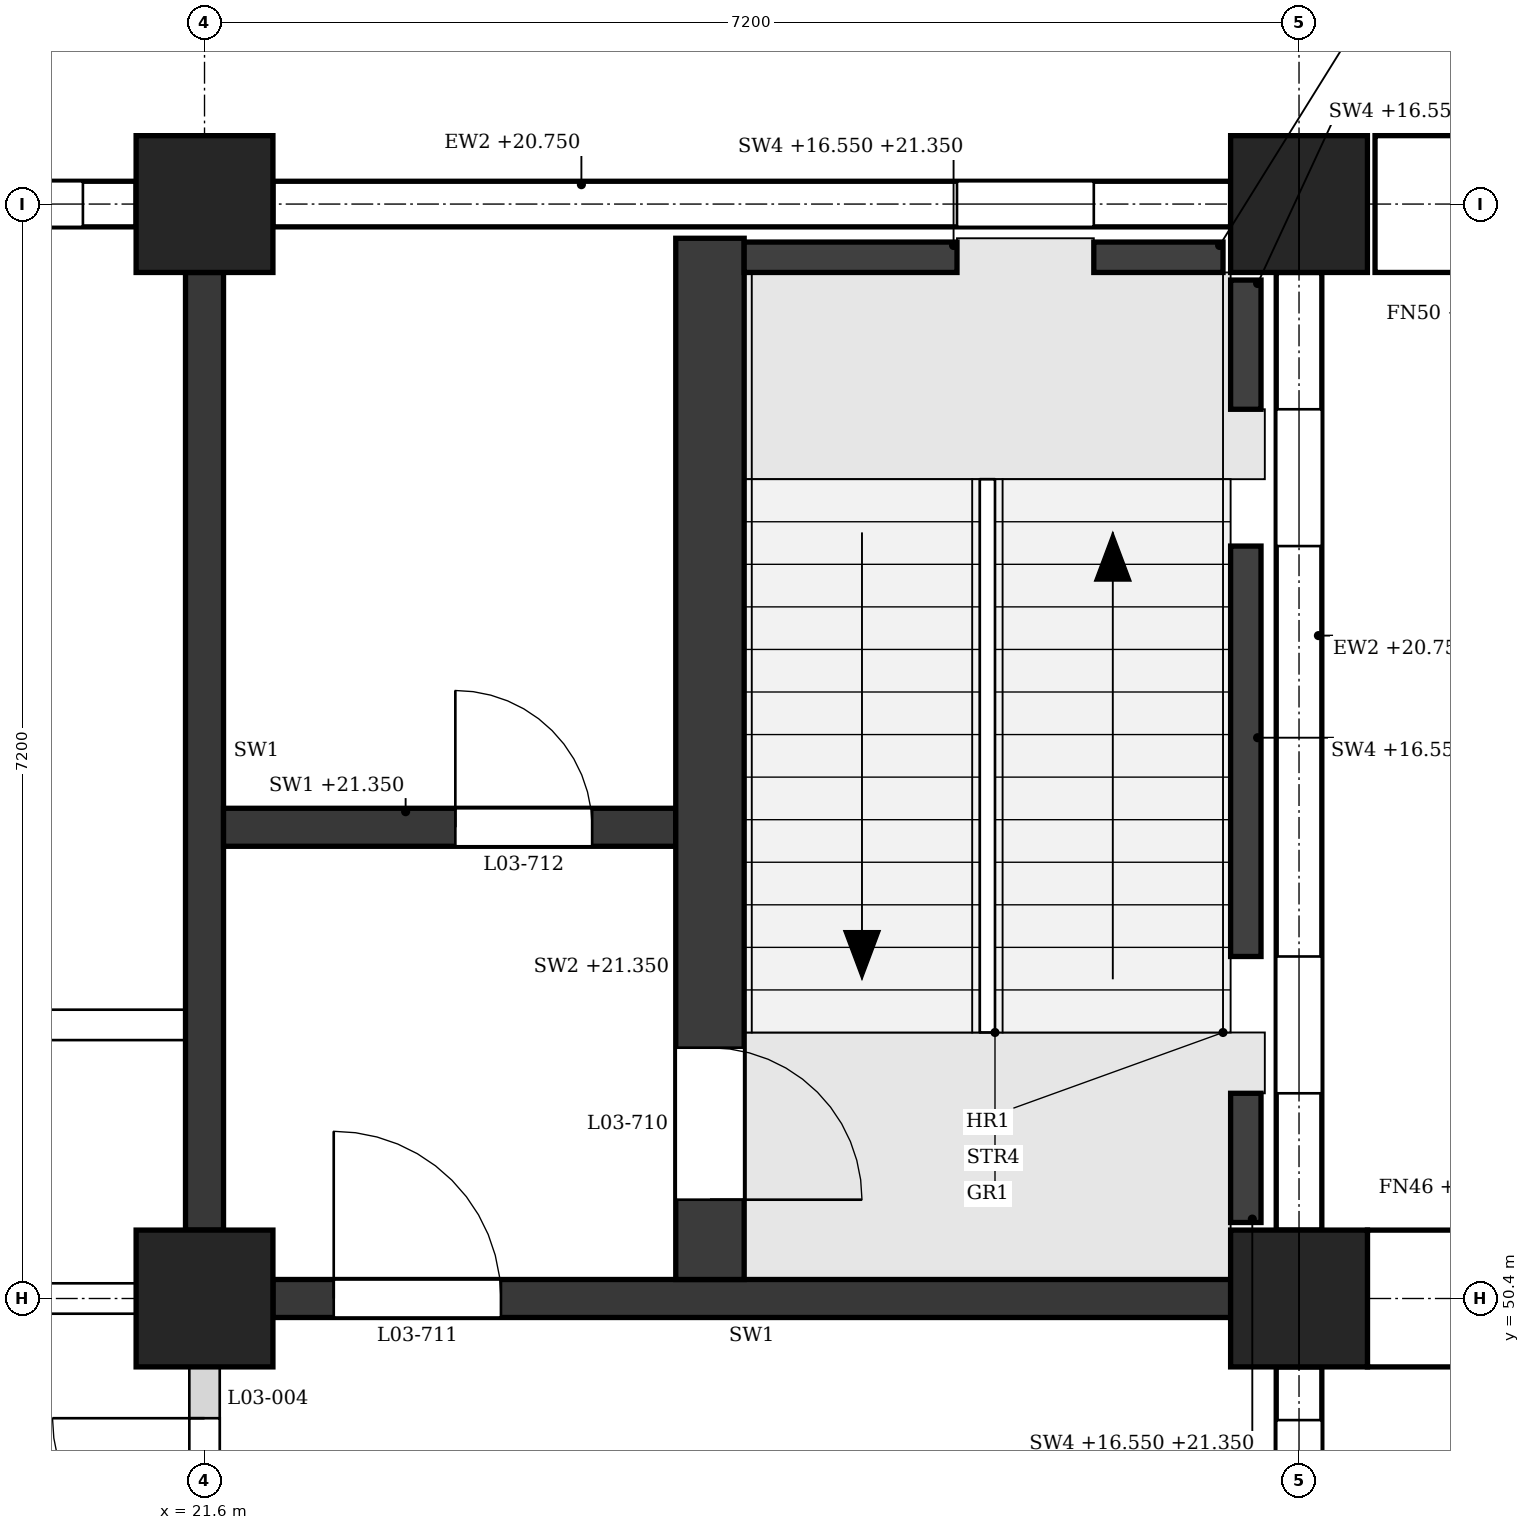
"""IFC4 building model, lengths in metres.
Left out: names, types, materials, properties, quantities, classifications, styles, units other than length and angle.
Written with IfcOpenShell. Run it as: python <this file> out.ifc"""

import sys

from ifc_helpers import new_model, si_unit, direction, frame, frame_2d, origin, origin_2d, place, context, subcontext, project, spatial, polyline, rectangle, outline, extrude, element, fill, save


model = new_model("IFC4")
c1 = context("Model", 3, precision=1e-05, world=origin(), true_north=direction((0.0, 1.0)))
c2 = subcontext(c1, "Body", "Model", "MODEL_VIEW")
j1 = project(units=[si_unit("LENGTHUNIT", "METRE"), si_unit("PLANEANGLEUNIT", "RADIAN")], contexts=[c1])
p1 = place(None, origin())
s1 = spatial("IfcSite", under=j1, at=p1, CompositionType="ELEMENT")
p2 = place(p1, origin())
s2 = spatial("IfcBuilding", under=s1, at=p2, CompositionType="ELEMENT")
p3 = place(p2, frame((0.0, 0.0, 16.8)))
s3 = spatial("IfcBuildingStorey", under=s2, at=p3, CompositionType="ELEMENT", Elevation=16.8)
for number, where, z_axis, x_axis in (
    (1, (21.6, 50.4, 0.0), (0.0, 0.0, 1.0), (1.0, 0.0, 0.0)),
    (2, (21.6, 57.6, 0.0), (0.0, 0.0, 1.0), (1.0, 0.0, 0.0)),
    (3, (28.8, 50.4, 0.0), (0.0, 0.0, 1.0), (1.0, 0.0, 0.0)),
    (4, (28.8, 57.6, 0.0), (0.0, 0.0, 1.0), (1.0, 0.0, 0.0)),
):
    element("IfcColumn", number, at=place(p3, frame(where, z_axis=z_axis, x_axis=x_axis)), inside=s3, PredefinedType="COLUMN", context=c2, shape_type="SweptSolid", body=[
        extrude(rectangle(XDim=0.9, YDim=0.9, at=origin_2d()), origin(), (0.0, 0.0, 1.0), 4.8),
    ])
p4 = place(p3, frame((28.35, 57.6, 0.0), z_axis=(0.0, 0.0, 1.0), x_axis=(-1.0, 0.0, 0.0)))
e5 = element("IfcWall", 5, at=p4, inside=s3, PredefinedType="STANDARD", context=c2, shape_type="SweptSolid", body=[
    extrude(rectangle(XDim=6.3, YDim=0.3, at=frame_2d((3.15, 0.0))), origin(), (0.0, 0.0, 1.0), 3.95),
])
p5 = place(p4, frame((0.9, 0.0, 0.9)))
e6 = element("IfcOpeningElement", 6, at=p5, cuts=e5, PredefinedType="OPENING", context=c2, shape_type="SweptSolid", body=[
    extrude(outline(polyline([(0.0, 0.0), (0.9, 0.0), (0.9, 2.05), (0.45, 2.5), (0.0, 2.05), (0.0, 0.0)])), frame((0.0, 0.16, 0.0), z_axis=(0.0, -1.0, 0.0), x_axis=(1.0, 0.0, 0.0)), (0.0, 0.0, 1.0), 0.32),
])
p6 = place(p3, frame((21.15, 57.6, 0.0), z_axis=(0.0, 0.0, 1.0), x_axis=(-1.0, 0.0, 0.0)))
e7 = element("IfcWall", 7, at=p6, inside=s3, PredefinedType="STANDARD", context=c2, shape_type="SweptSolid", body=[
    extrude(rectangle(XDim=6.3, YDim=0.3, at=frame_2d((3.15, 0.0))), origin(), (0.0, 0.0, 1.0), 3.95),
])
p7 = place(p6, frame((0.35, 0.0, 0.9)))
e8 = element("IfcOpeningElement", 8, at=p7, cuts=e7, PredefinedType="OPENING", context=c2, shape_type="SweptSolid", body=[
    extrude(outline(polyline([(0.0, 0.0), (0.85, 0.0), (0.85, 2.05), (0.425, 2.5), (0.0, 2.05), (0.0, 0.0)])), frame((0.0, 0.16, 0.0), z_axis=(0.0, -1.0, 0.0), x_axis=(1.0, 0.0, 0.0)), (0.0, 0.0, 1.0), 0.32),
])
p8 = place(p6, frame((1.5, 0.0, 0.9)))
e9 = element("IfcOpeningElement", 9, at=p8, cuts=e7, PredefinedType="OPENING", context=c2, shape_type="SweptSolid", body=[
    extrude(outline(polyline([(0.0, 0.0), (0.85, 0.0), (0.85, 2.05), (0.425, 2.5), (0.0, 2.05), (0.0, 0.0)])), frame((0.0, 0.16, 0.0), z_axis=(0.0, -1.0, 0.0), x_axis=(1.0, 0.0, 0.0)), (0.0, 0.0, 1.0), 0.32),
])
p9 = place(p6, frame((3.95, 0.0, 0.9)))
e10 = element("IfcOpeningElement", 10, at=p9, cuts=e7, PredefinedType="OPENING", context=c2, shape_type="SweptSolid", body=[
    extrude(outline(polyline([(0.0, 0.0), (0.85, 0.0), (0.85, 2.05), (0.425, 2.5), (0.0, 2.05), (0.0, 0.0)])), frame((0.0, 0.16, 0.0), z_axis=(0.0, -1.0, 0.0), x_axis=(1.0, 0.0, 0.0)), (0.0, 0.0, 1.0), 0.32),
])
p10 = place(p6, frame((5.1, 0.0, 0.9)))
e11 = element("IfcOpeningElement", 11, at=p10, cuts=e7, PredefinedType="OPENING", context=c2, shape_type="SweptSolid", body=[
    extrude(outline(polyline([(0.0, 0.0), (0.85, 0.0), (0.85, 2.05), (0.425, 2.5), (0.0, 2.05), (0.0, 0.0)])), frame((0.0, 0.16, 0.0), z_axis=(0.0, -1.0, 0.0), x_axis=(1.0, 0.0, 0.0)), (0.0, 0.0, 1.0), 0.32),
])
p11 = place(p3, frame((28.8, 43.65, 0.0), z_axis=(0.0, 0.0, 1.0), x_axis=(0.0, 1.0, 0.0)))
e12 = element("IfcWall", 12, at=p11, inside=s3, PredefinedType="STANDARD", context=c2, shape_type="SweptSolid", body=[
    extrude(rectangle(XDim=6.3, YDim=0.3, at=frame_2d((3.15, 0.0))), origin(), (0.0, 0.0, 1.0), 3.95),
])
p12 = place(p11, frame((3.95, 0.0, 0.9)))
e13 = element("IfcOpeningElement", 13, at=p12, cuts=e12, PredefinedType="OPENING", context=c2, shape_type="SweptSolid", body=[
    extrude(outline(polyline([(0.0, 0.0), (0.85, 0.0), (0.85, 2.05), (0.425, 2.5), (0.0, 2.05), (0.0, 0.0)])), frame((0.0, 0.16, 0.0), z_axis=(0.0, -1.0, 0.0), x_axis=(1.0, 0.0, 0.0)), (0.0, 0.0, 1.0), 0.32),
])
p13 = place(p11, frame((5.1, 0.0, 0.9)))
e14 = element("IfcOpeningElement", 14, at=p13, cuts=e12, PredefinedType="OPENING", context=c2, shape_type="SweptSolid", body=[
    extrude(outline(polyline([(0.0, 0.0), (0.85, 0.0), (0.85, 2.05), (0.425, 2.5), (0.0, 2.05), (0.0, 0.0)])), frame((0.0, 0.16, 0.0), z_axis=(0.0, -1.0, 0.0), x_axis=(1.0, 0.0, 0.0)), (0.0, 0.0, 1.0), 0.32),
])
p14 = place(p3, frame((28.8, 50.85, 0.0), z_axis=(0.0, 0.0, 1.0), x_axis=(0.0, 1.0, 0.0)))
e15 = element("IfcWall", 15, at=p14, inside=s3, PredefinedType="STANDARD", context=c2, shape_type="SweptSolid", body=[
    extrude(rectangle(XDim=6.3, YDim=0.3, at=frame_2d((3.15, 0.0))), origin(), (0.0, 0.0, 1.0), 3.95),
])
p15 = place(p14, frame((0.9, 0.0, 0.9)))
e16 = element("IfcOpeningElement", 16, at=p15, cuts=e15, PredefinedType="OPENING", context=c2, shape_type="SweptSolid", body=[
    extrude(outline(polyline([(0.0, 0.0), (0.9, 0.0), (0.9, 2.05), (0.45, 2.5), (0.0, 2.05), (0.0, 0.0)])), frame((0.0, 0.16, 0.0), z_axis=(0.0, -1.0, 0.0), x_axis=(1.0, 0.0, 0.0)), (0.0, 0.0, 1.0), 0.32),
])
p16 = place(p14, frame((4.5, 0.0, 0.9)))
e17 = element("IfcOpeningElement", 17, at=p16, cuts=e15, PredefinedType="OPENING", context=c2, shape_type="SweptSolid", body=[
    extrude(outline(polyline([(0.0, 0.0), (0.9, 0.0), (0.9, 2.05), (0.45, 2.5), (0.0, 2.05), (0.0, 0.0)])), frame((0.0, 0.16, 0.0), z_axis=(0.0, -1.0, 0.0), x_axis=(1.0, 0.0, 0.0)), (0.0, 0.0, 1.0), 0.32),
])
for number, where, z_axis, x_axis in (
    (18, (29.25, 50.4, 0.0), (0.0, 0.0, 1.0), (1.0, 0.0, 0.0)),
    (19, (29.3, 57.6, 0.0), (0.0, 0.0, 1.0), (1.0, 0.0, 0.0)),
):
    element("IfcWall", number, at=place(p3, frame(where, z_axis=z_axis, x_axis=x_axis)), inside=s3, PredefinedType="POLYGONAL", context=c2, shape_type="SweptSolid", body=[
        extrude(outline(polyline([(1.1, 0.0), (1.1, 4.55), (0.0, 4.55), (0.0, 0.0), (1.1, 0.0)])), frame((0.0, 0.45, 0.0), z_axis=(0.0, -1.0, 0.0), x_axis=(1.0, 0.0, 0.0)), (0.0, 0.0, 1.0), 0.9),
    ])
p17 = place(p3, frame((22.05, 50.4, 0.0), z_axis=(0.0, 0.0, 1.0), x_axis=(1.0, 0.0, 0.0)))
e20 = element("IfcWall", 20, at=p17, inside=s3, PredefinedType="SHEAR", context=c2, shape_type="SweptSolid", body=[
    extrude(rectangle(XDim=6.3, YDim=0.25, at=frame_2d((3.15, 0.0))), origin(), (0.0, 0.0, 1.0), 3.8),
])
p18 = place(p17, frame((0.4, 0.0, 0.0)))
e21 = element("IfcOpeningElement", 21, at=p18, cuts=e20, PredefinedType="OPENING", context=c2, shape_type="SweptSolid", body=[
    extrude(rectangle(XDim=1.1, YDim=2.1, at=frame_2d((0.55, 1.05))), frame((0.0, 0.135, 0.0), z_axis=(0.0, -1.0, 0.0), x_axis=(1.0, 0.0, 0.0)), (0.0, 0.0, 1.0), 0.27),
])
p19 = place(p3, frame((21.6, 50.85, 0.0), z_axis=(0.0, 0.0, 1.0), x_axis=(0.0, 1.0, 0.0)))
e22 = element("IfcWall", 22, at=p19, inside=s3, PredefinedType="SHEAR", context=c2, shape_type="SweptSolid", body=[
    extrude(rectangle(XDim=6.3, YDim=0.25, at=frame_2d((3.15, 0.0))), origin(), (0.0, 0.0, 1.0), 3.8),
])
p20 = place(p3, frame((28.45, 50.9, -0.25), z_axis=(0.0, 0.0, 1.0), x_axis=(0.0, 1.0, 0.0)))
e23 = element("IfcWall", 23, at=p20, inside=s3, PredefinedType="SHEAR", context=c2, shape_type="SweptSolid", body=[
    extrude(rectangle(XDim=0.85, YDim=0.2, at=frame_2d((0.425, 0.0))), origin(), (0.0, 0.0, 1.0), 4.8),
])
p21 = place(p3, frame((28.45, 52.65, -0.25), z_axis=(0.0, 0.0, 1.0), x_axis=(0.0, 1.0, 0.0)))
e24 = element("IfcWall", 24, at=p21, inside=s3, PredefinedType="SHEAR", context=c2, shape_type="SweptSolid", body=[
    extrude(rectangle(XDim=2.7, YDim=0.2, at=frame_2d((1.35, 0.0))), origin(), (0.0, 0.0, 1.0), 4.8),
])
p22 = place(p3, frame((28.45, 56.25, -0.25), z_axis=(0.0, 0.0, 1.0), x_axis=(0.0, 1.0, 0.0)))
e25 = element("IfcWall", 25, at=p22, inside=s3, PredefinedType="SHEAR", context=c2, shape_type="SweptSolid", body=[
    extrude(rectangle(XDim=0.85, YDim=0.2, at=frame_2d((0.425, 0.0))), origin(), (0.0, 0.0, 1.0), 4.8),
])
p23 = place(p3, frame((25.15, 57.25, -0.25), z_axis=(0.0, 0.0, 1.0), x_axis=(1.0, 0.0, 0.0)))
e26 = element("IfcWall", 26, at=p23, inside=s3, PredefinedType="SHEAR", context=c2, shape_type="SweptSolid", body=[
    extrude(rectangle(XDim=1.4, YDim=0.2, at=frame_2d((0.7, 0.0))), origin(), (0.0, 0.0, 1.0), 4.8),
])
p24 = place(p3, frame((27.45, 57.25, -0.25), z_axis=(0.0, 0.0, 1.0), x_axis=(1.0, 0.0, 0.0)))
e27 = element("IfcWall", 27, at=p24, inside=s3, PredefinedType="SHEAR", context=c2, shape_type="SweptSolid", body=[
    extrude(rectangle(XDim=0.85, YDim=0.2, at=frame_2d((0.425, 0.0))), origin(), (0.0, 0.0, 1.0), 4.8),
])
p25 = place(p3, frame((24.925, 50.525, 0.0), z_axis=(0.0, 0.0, 1.0), x_axis=(0.0, 1.0, 0.0)))
e28 = element("IfcWall", 28, at=p25, inside=s3, PredefinedType="SHEAR", context=c2, shape_type="SweptSolid", body=[
    extrude(rectangle(XDim=6.85, YDim=0.45, at=frame_2d((3.425, 0.0))), origin(), (0.0, 0.0, 1.0), 4.55),
])
p26 = place(p25, frame((0.525, 0.0, 0.0)))
e29 = element("IfcOpeningElement", 29, at=p26, cuts=e28, PredefinedType="OPENING", context=c2, shape_type="SweptSolid", body=[
    extrude(rectangle(XDim=1.0, YDim=2.1, at=frame_2d((0.5, 1.05))), frame((0.0, 0.235, 0.0), z_axis=(0.0, -1.0, 0.0), x_axis=(1.0, 0.0, 0.0)), (0.0, 0.0, 1.0), 0.47),
])
p27 = place(p3, frame((21.725, 53.5, 0.0), z_axis=(0.0, 0.0, 1.0), x_axis=(1.0, 0.0, 0.0)))
e30 = element("IfcWall", 30, at=p27, inside=s3, PredefinedType="SHEAR", context=c2, shape_type="SweptSolid", body=[
    extrude(rectangle(XDim=2.975, YDim=0.25, at=frame_2d((1.487, 0.0))), origin(), (0.0, 0.0, 1.0), 4.55),
])
p28 = place(p27, frame((1.525, 0.0, 0.0)))
e31 = element("IfcOpeningElement", 31, at=p28, cuts=e30, PredefinedType="OPENING", context=c2, shape_type="SweptSolid", body=[
    extrude(rectangle(XDim=0.9, YDim=2.1, at=frame_2d((0.45, 1.05))), frame((0.0, 0.135, 0.0), z_axis=(0.0, -1.0, 0.0), x_axis=(1.0, 0.0, 0.0)), (0.0, 0.0, 1.0), 0.27),
])
p29 = place(p3, frame((14.85, 50.4, 0.0), z_axis=(0.0, 0.0, 1.0), x_axis=(1.0, 0.0, 0.0)))
e32 = element("IfcWall", 32, at=p29, inside=s3, PredefinedType="PARTITIONING", context=c2, shape_type="SweptSolid", body=[
    extrude(rectangle(XDim=6.3, YDim=0.2, at=frame_2d((3.15, 0.0))), origin(), (0.0, 0.0, 1.0), 3.8),
])
p30 = place(p29, frame((4.225, 0.0, 0.0)))
e33 = element("IfcOpeningElement", 33, at=p30, cuts=e32, PredefinedType="OPENING", context=c2, shape_type="SweptSolid", body=[
    extrude(rectangle(XDim=1.0, YDim=2.1, at=frame_2d((0.5, 1.05))), frame((0.0, 0.11, 0.0), z_axis=(0.0, -1.0, 0.0), x_axis=(1.0, 0.0, 0.0)), (0.0, 0.0, 1.0), 0.22),
])
p31 = place(p3, frame((7.325, 52.2, 0.0), z_axis=(0.0, 0.0, 1.0), x_axis=(1.0, 0.0, 0.0)))
e34 = element("IfcWall", 34, at=p31, inside=s3, PredefinedType="PARTITIONING", context=c2, shape_type="SweptSolid", body=[
    extrude(outline(polyline([(0.0, 0.0), (14.15, 0.0), (14.15, 3.8), (14.025, 3.8), (14.025, 4.55), (7.325, 4.55), (7.325, 3.8), (6.825, 3.8), (6.825, 4.55), (0.125, 4.55), (0.125, 3.8), (0.0, 3.8), (0.0, 0.0)])), frame((0.0, 0.1, 0.0), z_axis=(0.0, -1.0, 0.0), x_axis=(1.0, 0.0, 0.0)), (0.0, 0.0, 1.0), 0.2),
])
p32 = place(p31, frame((1.238, 0.0, 0.0)))
e35 = element("IfcOpeningElement", 35, at=p32, cuts=e34, PredefinedType="OPENING", context=c2, shape_type="SweptSolid", body=[
    extrude(rectangle(XDim=1.0, YDim=2.1, at=frame_2d((0.5, 1.05))), frame((0.0, 0.11, 0.0), z_axis=(0.0, -1.0, 0.0), x_axis=(1.0, 0.0, 0.0)), (0.0, 0.0, 1.0), 0.22),
])
p33 = place(p31, frame((4.775, 0.0, 0.0)))
e36 = element("IfcOpeningElement", 36, at=p33, cuts=e34, PredefinedType="OPENING", context=c2, shape_type="SweptSolid", body=[
    extrude(rectangle(XDim=1.0, YDim=2.1, at=frame_2d((0.5, 1.05))), frame((0.0, 0.11, 0.0), z_axis=(0.0, -1.0, 0.0), x_axis=(1.0, 0.0, 0.0)), (0.0, 0.0, 1.0), 0.22),
])
p34 = place(p31, frame((8.375, 0.0, 0.0)))
e37 = element("IfcOpeningElement", 37, at=p34, cuts=e34, PredefinedType="OPENING", context=c2, shape_type="SweptSolid", body=[
    extrude(rectangle(XDim=1.0, YDim=2.1, at=frame_2d((0.5, 1.05))), frame((0.0, 0.11, 0.0), z_axis=(0.0, -1.0, 0.0), x_axis=(1.0, 0.0, 0.0)), (0.0, 0.0, 1.0), 0.22),
])
p35 = place(p31, frame((11.913, 0.0, 0.0)))
e38 = element("IfcOpeningElement", 38, at=p35, cuts=e34, PredefinedType="OPENING", context=c2, shape_type="SweptSolid", body=[
    extrude(rectangle(XDim=1.0, YDim=2.1, at=frame_2d((0.5, 1.05))), frame((0.0, 0.11, 0.0), z_axis=(0.0, -1.0, 0.0), x_axis=(1.0, 0.0, 0.0)), (0.0, 0.0, 1.0), 0.22),
])
p36 = place(p3, frame((21.6, 47.275, 0.0), z_axis=(0.0, 0.0, 1.0), x_axis=(0.0, 1.0, 0.0)))
e39 = element("IfcWall", 39, at=p36, inside=s3, PredefinedType="PARTITIONING", context=c2, shape_type="SweptSolid", body=[
    extrude(rectangle(XDim=2.675, YDim=0.2, at=frame_2d((1.337, 0.0))), origin(), (0.0, 0.0, 1.0), 3.8),
])
p37 = place(p36, frame((0.337, 0.0, 0.0)))
e40 = element("IfcOpeningElement", 40, at=p37, cuts=e39, PredefinedType="OPENING", context=c2, shape_type="SweptSolid", body=[
    extrude(rectangle(XDim=2.0, YDim=2.4, at=frame_2d((1.0, 1.2))), frame((0.0, 0.11, 0.0), z_axis=(0.0, -1.0, 0.0), x_axis=(1.0, 0.0, 0.0)), (0.0, 0.0, 1.0), 0.22),
])
p38 = place(p13, origin())
e41 = element("IfcWindow", 41, at=p38, inside=s3, PartitioningType="SINGLE_PANEL", PredefinedType="WINDOW", context=c2, shape_type="SweptSolid", body=[
    extrude(outline(polyline([(0.0, 0.0), (0.85, 0.0), (0.85, 2.05), (0.425, 2.5), (0.0, 2.05), (0.0, 0.0)])), frame((0.0, 0.03, 0.0), z_axis=(0.0, -1.0, 0.0), x_axis=(1.0, 0.0, 0.0)), (0.0, 0.0, 1.0), 0.06),
])
fill(e14, e41)
p39 = place(p15, origin())
e42 = element("IfcWindow", 42, at=p39, inside=s3, PartitioningType="SINGLE_PANEL", PredefinedType="WINDOW", context=c2, shape_type="SweptSolid", body=[
    extrude(outline(polyline([(0.0, 0.0), (0.9, 0.0), (0.9, 2.05), (0.45, 2.5), (0.0, 2.05), (0.0, 0.0)])), frame((0.0, 0.03, 0.0), z_axis=(0.0, -1.0, 0.0), x_axis=(1.0, 0.0, 0.0)), (0.0, 0.0, 1.0), 0.06),
])
fill(e16, e42)
p40 = place(p16, origin())
e43 = element("IfcWindow", 43, at=p40, inside=s3, PartitioningType="SINGLE_PANEL", PredefinedType="WINDOW", context=c2, shape_type="SweptSolid", body=[
    extrude(outline(polyline([(0.0, 0.0), (0.9, 0.0), (0.9, 2.05), (0.45, 2.5), (0.0, 2.05), (0.0, 0.0)])), frame((0.0, 0.03, 0.0), z_axis=(0.0, -1.0, 0.0), x_axis=(1.0, 0.0, 0.0)), (0.0, 0.0, 1.0), 0.06),
])
fill(e17, e43)
p41 = place(p5, origin())
e44 = element("IfcWindow", 44, at=p41, inside=s3, PartitioningType="SINGLE_PANEL", PredefinedType="WINDOW", context=c2, shape_type="SweptSolid", body=[
    extrude(outline(polyline([(0.0, 0.0), (0.9, 0.0), (0.9, 2.05), (0.45, 2.5), (0.0, 2.05), (0.0, 0.0)])), frame((0.0, 0.03, 0.0), z_axis=(0.0, -1.0, 0.0), x_axis=(1.0, 0.0, 0.0)), (0.0, 0.0, 1.0), 0.06),
])
fill(e6, e44)
p42 = place(p7, origin())
e45 = element("IfcWindow", 45, at=p42, inside=s3, PartitioningType="SINGLE_PANEL", PredefinedType="WINDOW", context=c2, shape_type="SweptSolid", body=[
    extrude(outline(polyline([(0.0, 0.0), (0.85, 0.0), (0.85, 2.05), (0.425, 2.5), (0.0, 2.05), (0.0, 0.0)])), frame((0.0, 0.03, 0.0), z_axis=(0.0, -1.0, 0.0), x_axis=(1.0, 0.0, 0.0)), (0.0, 0.0, 1.0), 0.06),
])
fill(e8, e45)
p43 = place(p26, frame((1.0, 0.0, 0.0), z_axis=(0.0, 0.0, 1.0), x_axis=(-1.0, 0.0, 0.0)))
e46 = element("IfcDoor", 46, at=p43, inside=s3, OperationType="SINGLE_SWING_RIGHT", PredefinedType="DOOR", context=c2, shape_type="SweptSolid", body=[
    extrude(rectangle(XDim=1.0, YDim=2.1, at=frame_2d((0.5, 1.05))), frame((0.0, 0.025, 0.0), z_axis=(0.0, -1.0, 0.0), x_axis=(1.0, 0.0, 0.0)), (0.0, 0.0, 1.0), 0.05),
])
fill(e29, e46)
p44 = place(p18, origin())
e47 = element("IfcDoor", 47, at=p44, inside=s3, OperationType="SINGLE_SWING_LEFT", PredefinedType="DOOR", context=c2, shape_type="SweptSolid", body=[
    extrude(rectangle(XDim=1.1, YDim=2.1, at=frame_2d((0.55, 1.05))), frame((0.0, 0.025, 0.0), z_axis=(0.0, -1.0, 0.0), x_axis=(1.0, 0.0, 0.0)), (0.0, 0.0, 1.0), 0.05),
])
fill(e21, e47)
p45 = place(p28, origin())
e48 = element("IfcDoor", 48, at=p45, inside=s3, OperationType="SINGLE_SWING_LEFT", PredefinedType="DOOR", context=c2, shape_type="SweptSolid", body=[
    extrude(rectangle(XDim=0.9, YDim=2.1, at=frame_2d((0.45, 1.05))), frame((0.0, 0.025, 0.0), z_axis=(0.0, -1.0, 0.0), x_axis=(1.0, 0.0, 0.0)), (0.0, 0.0, 1.0), 0.05),
])
fill(e31, e48)
p46 = place(p37, origin())
e49 = element("IfcDoor", 49, at=p46, inside=s3, OperationType="DOUBLE_DOOR_SINGLE_SWING", PredefinedType="DOOR", context=c2, shape_type="SweptSolid", body=[
    extrude(rectangle(XDim=2.0, YDim=2.4, at=frame_2d((1.0, 1.2))), frame((0.0, 0.025, 0.0), z_axis=(0.0, -1.0, 0.0), x_axis=(1.0, 0.0, 0.0)), (0.0, 0.0, 1.0), 0.05),
])
fill(e40, e49)
save(model, sys.argv[1])
